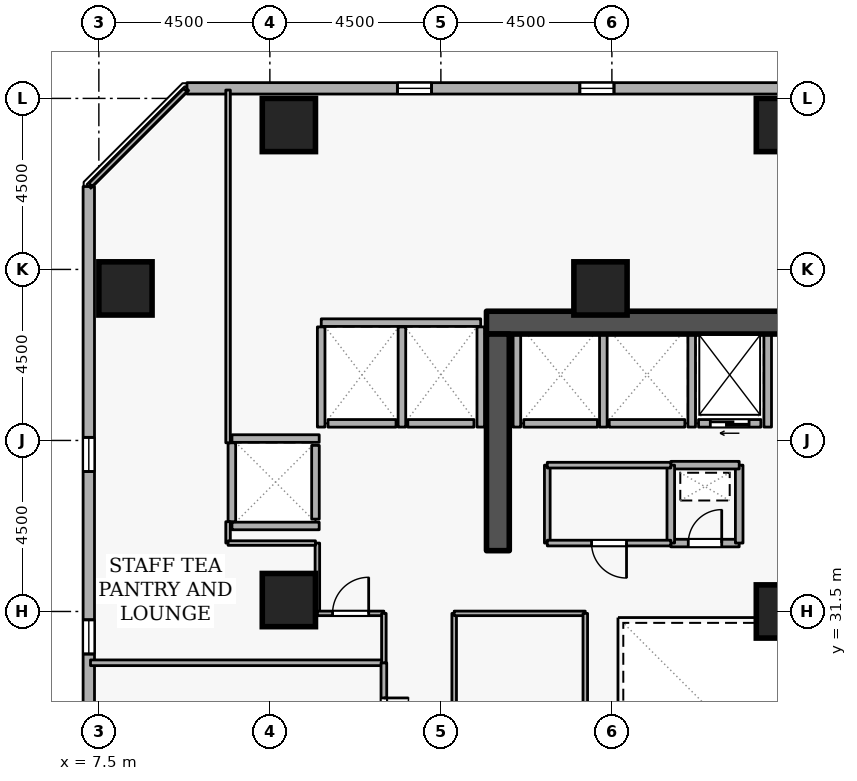
"""IFC4 building model, lengths in metres.
Left out: names, types, materials, properties, quantities, classifications, styles, units other than length and angle.
Written with IfcOpenShell. Run it as: python <this file> out.ifc"""

import sys

from ifc_helpers import new_model, si_unit, direction, frame, frame_2d, origin, origin_2d, place, context, subcontext, project, spatial, rectangle, extrude, element, fill, save


model = new_model("IFC4")
c1 = context("Model", 3, precision=1e-05, world=origin(), true_north=direction((0.0, 1.0)))
c2 = subcontext(c1, "Body", "Model", "MODEL_VIEW")
j1 = project(units=[si_unit("LENGTHUNIT", "METRE"), si_unit("PLANEANGLEUNIT", "RADIAN")], contexts=[c1])
p1 = place(None, origin())
s1 = spatial("IfcSite", under=j1, at=p1, CompositionType="ELEMENT")
p2 = place(p1, origin())
s2 = spatial("IfcBuilding", under=s1, at=p2, CompositionType="ELEMENT")
p3 = place(p2, frame((0.0, 0.0, 64.5)))
s3 = spatial("IfcBuildingStorey", under=s2, at=p3, CompositionType="ELEMENT", Elevation=64.5)
p4 = place(p3, frame((17.7, 39.1, 0.0), z_axis=(0.0, 0.0, 1.0), x_axis=(1.0, 0.0, 0.0)))
e1 = element("IfcWall", 1, at=p4, inside=s3, PredefinedType="SHEAR", context=c2, shape_type="SweptSolid", body=[
    extrude(rectangle(XDim=15.6, YDim=0.6, at=frame_2d((7.8, 0.0))), origin(), (0.0, 0.0, 1.0), 3.6),
])
p5 = place(p3, frame((18.0, 33.1, 0.0), z_axis=(0.0, 0.0, 1.0), x_axis=(0.0, 1.0, 0.0)))
e2 = element("IfcWall", 2, at=p5, inside=s3, PredefinedType="SHEAR", context=c2, shape_type="SweptSolid", body=[
    extrude(rectangle(XDim=5.7, YDim=0.6, at=frame_2d((2.85, 0.0))), origin(), (0.0, 0.0, 1.0), 3.6),
])
for number, where, z_axis, x_axis in (
    (3, (12.5, 44.3, 0.0), (0.0, 0.0, 1.0), (1.0, 0.0, 0.0)),
    (4, (25.5, 44.3, 0.0), (0.0, 0.0, 1.0), (1.0, 0.0, 0.0)),
    (5, (8.2, 40.0, 0.0), (0.0, 0.0, 1.0), (1.0, 0.0, 0.0)),
    (6, (12.5, 31.8, 0.0), (0.0, 0.0, 1.0), (1.0, 0.0, 0.0)),
    (7, (20.7, 40.0, 0.0), (0.0, 0.0, 1.0), (1.0, 0.0, 0.0)),
    (8, (25.5, 31.5, 0.0), (0.0, 0.0, 1.0), (1.0, 0.0, 0.0)),
):
    element("IfcColumn", number, at=place(p3, frame(where, z_axis=z_axis, x_axis=x_axis)), inside=s3, PredefinedType="COLUMN", context=c2, shape_type="SweptSolid", body=[
        extrude(rectangle(XDim=1.4, YDim=1.4, at=origin_2d()), origin(), (0.0, 0.0, 1.0), 3.6),
    ])
p6 = place(p3, frame((46.855, 45.264, 0.0), z_axis=(0.0, 0.0, 1.0), x_axis=(-0.999999999457, 3.2959355e-05, 0.0)))
e9 = element("IfcWall", 9, at=p6, inside=s3, PredefinedType="STANDARD", context=c2, shape_type="SweptSolid", body=[
    extrude(rectangle(XDim=37.037, YDim=0.3, at=frame_2d((18.518, 0.0))), origin(), (0.0, 0.0, 1.0), 2.7),
])
p7 = place(p6, frame((1.8, 0.0, 0.72)))
e10 = element("IfcOpeningElement", 10, at=p7, cuts=e9, PredefinedType="OPENING", context=c2, shape_type="SweptSolid", body=[
    extrude(rectangle(XDim=0.9, YDim=1.75, at=frame_2d((0.45, 0.875))), frame((0.0, 0.16, 0.0), z_axis=(0.0, -1.0, 0.0), x_axis=(1.0, 0.0, 0.0)), (0.0, 0.0, 1.0), 0.32),
])
p8 = place(p6, frame((11.4, 0.0, 0.72)))
e11 = element("IfcOpeningElement", 11, at=p8, cuts=e9, PredefinedType="OPENING", context=c2, shape_type="SweptSolid", body=[
    extrude(rectangle(XDim=0.9, YDim=1.75, at=frame_2d((0.45, 0.875))), frame((0.0, 0.16, 0.0), z_axis=(0.0, -1.0, 0.0), x_axis=(1.0, 0.0, 0.0)), (0.0, 0.0, 1.0), 0.32),
])
p9 = place(p6, frame((16.2, 0.0, 0.72)))
e12 = element("IfcOpeningElement", 12, at=p9, cuts=e9, PredefinedType="OPENING", context=c2, shape_type="SweptSolid", body=[
    extrude(rectangle(XDim=0.9, YDim=1.75, at=frame_2d((0.45, 0.875))), frame((0.0, 0.16, 0.0), z_axis=(0.0, -1.0, 0.0), x_axis=(1.0, 0.0, 0.0)), (0.0, 0.0, 1.0), 0.32),
])
p10 = place(p6, frame((25.8, 0.0, 0.72)))
e13 = element("IfcOpeningElement", 13, at=p10, cuts=e9, PredefinedType="OPENING", context=c2, shape_type="SweptSolid", body=[
    extrude(rectangle(XDim=0.9, YDim=1.75, at=frame_2d((0.45, 0.875))), frame((0.0, 0.16, 0.0), z_axis=(0.0, -1.0, 0.0), x_axis=(1.0, 0.0, 0.0)), (0.0, 0.0, 1.0), 0.32),
])
p11 = place(p6, frame((30.6, 0.0, 0.72)))
e14 = element("IfcOpeningElement", 14, at=p11, cuts=e9, PredefinedType="OPENING", context=c2, shape_type="SweptSolid", body=[
    extrude(rectangle(XDim=0.9, YDim=1.75, at=frame_2d((0.45, 0.875))), frame((0.0, 0.16, 0.0), z_axis=(0.0, -1.0, 0.0), x_axis=(1.0, 0.0, 0.0)), (0.0, 0.0, 1.0), 0.32),
])
p12 = place(p3, frame((7.235, 42.681, 0.0), z_axis=(0.0, 0.0, 1.0), x_axis=(3.2959355e-05, -0.999999999457, 0.0)))
e15 = element("IfcWall", 15, at=p12, inside=s3, PredefinedType="STANDARD", context=c2, shape_type="SweptSolid", body=[
    extrude(rectangle(XDim=37.037, YDim=0.3, at=frame_2d((18.518, 0.0))), origin(), (0.0, 0.0, 1.0), 2.7),
])
p13 = place(p12, frame((6.6, 0.0, 0.72)))
e16 = element("IfcOpeningElement", 16, at=p13, cuts=e15, PredefinedType="OPENING", context=c2, shape_type="SweptSolid", body=[
    extrude(rectangle(XDim=0.9, YDim=1.75, at=frame_2d((0.45, 0.875))), frame((0.0, 0.16, 0.0), z_axis=(0.0, -1.0, 0.0), x_axis=(1.0, 0.0, 0.0)), (0.0, 0.0, 1.0), 0.32),
])
p14 = place(p12, frame((11.4, 0.0, 0.72)))
e17 = element("IfcOpeningElement", 17, at=p14, cuts=e15, PredefinedType="OPENING", context=c2, shape_type="SweptSolid", body=[
    extrude(rectangle(XDim=0.9, YDim=1.75, at=frame_2d((0.45, 0.875))), frame((0.0, 0.16, 0.0), z_axis=(0.0, -1.0, 0.0), x_axis=(1.0, 0.0, 0.0)), (0.0, 0.0, 1.0), 0.32),
])
p15 = place(p12, frame((21.0, 0.0, 0.72)))
e18 = element("IfcOpeningElement", 18, at=p15, cuts=e15, PredefinedType="OPENING", context=c2, shape_type="SweptSolid", body=[
    extrude(rectangle(XDim=0.9, YDim=1.75, at=frame_2d((0.45, 0.875))), frame((0.0, 0.16, 0.0), z_axis=(0.0, -1.0, 0.0), x_axis=(1.0, 0.0, 0.0)), (0.0, 0.0, 1.0), 0.32),
])
p16 = place(p12, frame((25.8, 0.0, 0.72)))
e19 = element("IfcOpeningElement", 19, at=p16, cuts=e15, PredefinedType="OPENING", context=c2, shape_type="SweptSolid", body=[
    extrude(rectangle(XDim=0.9, YDim=1.75, at=frame_2d((0.45, 0.875))), frame((0.0, 0.16, 0.0), z_axis=(0.0, -1.0, 0.0), x_axis=(1.0, 0.0, 0.0)), (0.0, 0.0, 1.0), 0.32),
])
p17 = place(p3, frame((24.92, 36.45, 0.0), z_axis=(0.0, 0.0, 1.0), x_axis=(-1.0, 0.0, 0.0)))
e20 = element("IfcWall", 20, at=p17, inside=s3, PredefinedType="STANDARD", context=c2, shape_type="SweptSolid", body=[
    extrude(rectangle(XDim=1.64, YDim=0.2, at=frame_2d((0.82, 0.0))), origin(), (0.0, 0.0, 1.0), 3.34),
])
p18 = place(p17, frame((0.31, 0.0, 0.0)))
e21 = element("IfcOpeningElement", 21, at=p18, cuts=e20, PredefinedType="OPENING", context=c2, shape_type="SweptSolid", body=[
    extrude(rectangle(XDim=1.02, YDim=2.06, at=frame_2d((0.51, 1.03))), frame((0.0, 0.11, 0.0), z_axis=(0.0, -1.0, 0.0), x_axis=(1.0, 0.0, 0.0)), (0.0, 0.0, 1.0), 0.22),
])
p19 = place(p3, frame((22.92, 36.45, 0.0), z_axis=(0.0, 0.0, 1.0), x_axis=(-1.0, 0.0, 0.0)))
e22 = element("IfcWall", 22, at=p19, inside=s3, PredefinedType="STANDARD", context=c2, shape_type="SweptSolid", body=[
    extrude(rectangle(XDim=1.99, YDim=0.2, at=frame_2d((0.995, 0.0))), origin(), (0.0, 0.0, 1.0), 3.34),
])
p20 = place(p3, frame((20.62, 36.45, 0.0), z_axis=(0.0, 0.0, 1.0), x_axis=(-1.0, 0.0, 0.0)))
e23 = element("IfcWall", 23, at=p20, inside=s3, PredefinedType="STANDARD", context=c2, shape_type="SweptSolid", body=[
    extrude(rectangle(XDim=1.94, YDim=0.2, at=frame_2d((0.97, 0.0))), origin(), (0.0, 0.0, 1.0), 3.34),
])
p21 = place(p3, frame((17.37, 36.45, 0.0), z_axis=(0.0, 0.0, 1.0), x_axis=(-1.0, 0.0, 0.0)))
e24 = element("IfcWall", 24, at=p21, inside=s3, PredefinedType="STANDARD", context=c2, shape_type="SweptSolid", body=[
    extrude(rectangle(XDim=1.74, YDim=0.2, at=frame_2d((0.87, 0.0))), origin(), (0.0, 0.0, 1.0), 3.34),
])
p22 = place(p3, frame((15.32, 36.45, 0.0), z_axis=(0.0, 0.0, 1.0), x_axis=(-1.0, 0.0, 0.0)))
e25 = element("IfcWall", 25, at=p22, inside=s3, PredefinedType="STANDARD", context=c2, shape_type="SweptSolid", body=[
    extrude(rectangle(XDim=1.79, YDim=0.2, at=frame_2d((0.895, 0.0))), origin(), (0.0, 0.0, 1.0), 3.34),
])
p23 = place(p3, frame((13.2, 33.93, 0.0), z_axis=(0.0, 0.0, 1.0), x_axis=(0.0, 1.0, 0.0)))
e26 = element("IfcWall", 26, at=p23, inside=s3, PredefinedType="STANDARD", context=c2, shape_type="SweptSolid", body=[
    extrude(rectangle(XDim=1.94, YDim=0.2, at=frame_2d((0.97, 0.0))), origin(), (0.0, 0.0, 1.0), 3.34),
])
for number, where, z_axis, x_axis in (
    (27, (25.1, 36.352, 0.0), (0.0, 0.0, 1.0), (0.0, 1.0, 0.0)),
    (28, (23.1, 36.352, 0.0), (0.0, 0.0, 1.0), (0.0, 1.0, 0.0)),
    (29, (20.775, 36.352, 0.0), (0.0, 0.0, 1.0), (0.0, 1.0, 0.0)),
    (30, (18.5, 36.352, 0.0), (0.0, 0.0, 1.0), (0.0, 1.0, 0.0)),
):
    element("IfcWall", number, at=place(p3, frame(where, z_axis=z_axis, x_axis=x_axis)), inside=s3, PredefinedType="STANDARD", context=c2, shape_type="SweptSolid", body=[
        extrude(rectangle(XDim=2.436, YDim=0.2, at=frame_2d((1.218, 0.0))), origin(), (0.0, 0.0, 1.0), 3.34),
    ])
p24 = place(p3, frame((13.352, 39.1, 0.0), z_axis=(0.0, 0.0, 1.0), x_axis=(1.0, 0.0, 0.0)))
e31 = element("IfcWall", 31, at=p24, inside=s3, PredefinedType="STANDARD", context=c2, shape_type="SweptSolid", body=[
    extrude(rectangle(XDim=4.196, YDim=0.2, at=frame_2d((2.098, 0.0))), origin(), (0.0, 0.0, 1.0), 3.34),
])
p25 = place(p3, frame((17.55, 36.352, 0.0), z_axis=(0.0, 0.0, 1.0), x_axis=(0.0, 1.0, 0.0)))
e32 = element("IfcWall", 32, at=p25, inside=s3, PredefinedType="STANDARD", context=c2, shape_type="SweptSolid", body=[
    extrude(rectangle(XDim=2.636, YDim=0.2, at=frame_2d((1.318, 0.0))), origin(), (0.0, 0.0, 1.0), 2.545),
])
for number, where, z_axis, x_axis in (
    (33, (15.475, 36.352, 0.0), (0.0, 0.0, 1.0), (0.0, 1.0, 0.0)),
    (34, (13.35, 36.352, 0.0), (0.0, 0.0, 1.0), (0.0, 1.0, 0.0)),
):
    element("IfcWall", number, at=place(p3, frame(where, z_axis=z_axis, x_axis=x_axis)), inside=s3, PredefinedType="STANDARD", context=c2, shape_type="SweptSolid", body=[
        extrude(rectangle(XDim=2.636, YDim=0.2, at=frame_2d((1.318, 0.0))), origin(), (0.0, 0.0, 1.0), 3.34),
    ])
for number, where, z_axis, x_axis in (
    (35, (11.002, 36.05, 0.0), (0.0, 0.0, 1.0), (1.0, 0.0, 0.0)),
    (36, (11.002, 33.75, 0.0), (0.0, 0.0, 1.0), (1.0, 0.0, 0.0)),
):
    element("IfcWall", number, at=place(p3, frame(where, z_axis=z_axis, x_axis=x_axis)), inside=s3, PredefinedType="STANDARD", context=c2, shape_type="SweptSolid", body=[
        extrude(rectangle(XDim=2.296, YDim=0.2, at=frame_2d((1.148, 0.0))), origin(), (0.0, 0.0, 1.0), 3.34),
    ])
p26 = place(p3, frame((11.0, 33.862, 0.0), z_axis=(0.0, 0.0, 1.0), x_axis=(0.0, 1.0, 0.0)))
e37 = element("IfcWall", 37, at=p26, inside=s3, PredefinedType="STANDARD", context=c2, shape_type="SweptSolid", body=[
    extrude(rectangle(XDim=2.076, YDim=0.2, at=frame_2d((1.038, 0.0))), origin(), (0.0, 0.0, 1.0), 3.34),
])
p27 = place(p3, frame((22.55, 33.3, 0.0), z_axis=(0.0, 0.0, 1.0), x_axis=(1.0, 0.0, 0.0)))
e38 = element("IfcWall", 38, at=p27, inside=s3, PredefinedType="STANDARD", context=c2, shape_type="SweptSolid", body=[
    extrude(rectangle(XDim=1.8, YDim=0.2, at=frame_2d((0.9, 0.0))), origin(), (0.0, 0.0, 1.0), 3.34),
])
p28 = place(p27, frame((0.46, 0.0, 0.0)))
e39 = element("IfcOpeningElement", 39, at=p28, cuts=e38, PredefinedType="OPENING", context=c2, shape_type="SweptSolid", body=[
    extrude(rectangle(XDim=0.88, YDim=2.04, at=frame_2d((0.44, 1.02))), frame((0.0, 0.11, 0.0), z_axis=(0.0, -1.0, 0.0), x_axis=(1.0, 0.0, 0.0)), (0.0, 0.0, 1.0), 0.22),
])
p29 = place(p3, frame((24.35, 33.3, 0.0), z_axis=(0.0, 0.0, 1.0), x_axis=(0.0, 1.0, 0.0)))
e40 = element("IfcWall", 40, at=p29, inside=s3, PredefinedType="STANDARD", context=c2, shape_type="SweptSolid", body=[
    extrude(rectangle(XDim=2.05, YDim=0.2, at=frame_2d((1.025, 0.0))), origin(), (0.0, 0.0, 1.0), 3.34),
])
p30 = place(p3, frame((24.35, 35.35, 0.0), z_axis=(0.0, 0.0, 1.0), x_axis=(-1.0, 0.0, 0.0)))
e41 = element("IfcWall", 41, at=p30, inside=s3, PredefinedType="STANDARD", context=c2, shape_type="SweptSolid", body=[
    extrude(rectangle(XDim=1.8, YDim=0.2, at=frame_2d((0.9, 0.0))), origin(), (0.0, 0.0, 1.0), 3.34),
])
p31 = place(p3, frame((22.55, 35.35, 0.0), z_axis=(0.0, 0.0, 1.0), x_axis=(0.0, -1.0, 0.0)))
e42 = element("IfcWall", 42, at=p31, inside=s3, PredefinedType="STANDARD", context=c2, shape_type="SweptSolid", body=[
    extrude(rectangle(XDim=2.05, YDim=0.2, at=frame_2d((1.025, 0.0))), origin(), (0.0, 0.0, 1.0), 3.34),
])
p32 = place(p3, frame((19.3, 33.3, 0.0), z_axis=(0.0, 0.0, 1.0), x_axis=(0.0, 1.0, 0.0)))
e43 = element("IfcWall", 43, at=p32, inside=s3, PredefinedType="PARTITIONING", context=c2, shape_type="SweptSolid", body=[
    extrude(rectangle(XDim=2.05, YDim=0.15, at=frame_2d((1.025, 0.0))), origin(), (0.0, 0.0, 1.0), 3.34),
])
p33 = place(p3, frame((19.3, 35.35, 0.0), z_axis=(0.0, 0.0, 1.0), x_axis=(1.0, 0.0, 0.0)))
e44 = element("IfcWall", 44, at=p33, inside=s3, PredefinedType="PARTITIONING", context=c2, shape_type="SweptSolid", body=[
    extrude(rectangle(XDim=3.25, YDim=0.15, at=frame_2d((1.625, 0.0))), origin(), (0.0, 0.0, 1.0), 3.34),
])
p34 = place(p3, frame((22.55, 33.3, 0.0), z_axis=(0.0, 0.0, 1.0), x_axis=(-1.0, 0.0, 0.0)))
e45 = element("IfcWall", 45, at=p34, inside=s3, PredefinedType="PARTITIONING", context=c2, shape_type="SweptSolid", body=[
    extrude(rectangle(XDim=3.25, YDim=0.15, at=frame_2d((1.625, 0.0))), origin(), (0.0, 0.0, 1.0), 3.34),
])
p35 = place(p34, frame((1.165, 0.0, 0.0)))
e46 = element("IfcOpeningElement", 46, at=p35, cuts=e45, PredefinedType="OPENING", context=c2, shape_type="SweptSolid", body=[
    extrude(rectangle(XDim=0.92, YDim=2.08, at=frame_2d((0.46, 1.04))), frame((0.0, 0.085, 0.0), z_axis=(0.0, -1.0, 0.0), x_axis=(1.0, 0.0, 0.0)), (0.0, 0.0, 1.0), 0.17),
])
p36 = place(p3, frame((7.28, 30.15, 0.0), z_axis=(0.0, 0.0, 1.0), x_axis=(1.0, 0.0, 0.0)))
e47 = element("IfcWall", 47, at=p36, inside=s3, PredefinedType="PARTITIONING", context=c2, shape_type="SweptSolid", body=[
    extrude(rectangle(XDim=7.72, YDim=0.15, at=frame_2d((3.86, 0.0))), origin(), (0.0, 0.0, 1.0), 3.34),
])
p37 = place(p3, frame((15.0, 30.15, 0.0), z_axis=(0.0, 0.0, 1.0), x_axis=(0.0, -1.0, 0.0)))
e48 = element("IfcWall", 48, at=p37, inside=s3, PredefinedType="PARTITIONING", context=c2, shape_type="SweptSolid", body=[
    extrude(rectangle(XDim=3.15, YDim=0.15, at=frame_2d((1.575, 0.0))), origin(), (0.0, 0.0, 1.0), 3.34),
])
p38 = place(p37, frame((0.925, 0.0, 0.0)))
e49 = element("IfcOpeningElement", 49, at=p38, cuts=e48, PredefinedType="OPENING", context=c2, shape_type="SweptSolid", body=[
    extrude(rectangle(XDim=1.3, YDim=2.12, at=frame_2d((0.65, 1.06))), frame((0.0, 0.085, 0.0), z_axis=(0.0, -1.0, 0.0), x_axis=(1.0, 0.0, 0.0)), (0.0, 0.0, 1.0), 0.17),
])
p39 = place(p3, frame((13.25, 33.3, 0.0), z_axis=(0.0, 0.0, 1.0), x_axis=(0.0, -1.0, 0.0)))
e50 = element("IfcWall", 50, at=p39, inside=s3, PredefinedType="PARTITIONING", context=c2, shape_type="SweptSolid", body=[
    extrude(rectangle(XDim=1.85, YDim=0.12, at=frame_2d((0.925, 0.0))), origin(), (0.0, 0.0, 1.0), 3.34),
])
p40 = place(p3, frame((13.25, 31.45, 0.0), z_axis=(0.0, 0.0, 1.0), x_axis=(1.0, 0.0, 0.0)))
e51 = element("IfcWall", 51, at=p40, inside=s3, PredefinedType="PARTITIONING", context=c2, shape_type="SweptSolid", body=[
    extrude(rectangle(XDim=1.75, YDim=0.12, at=frame_2d((0.875, 0.0))), origin(), (0.0, 0.0, 1.0), 3.34),
])
p41 = place(p40, frame((0.4, 0.0, 0.0)))
e52 = element("IfcOpeningElement", 52, at=p41, cuts=e51, PredefinedType="OPENING", context=c2, shape_type="SweptSolid", body=[
    extrude(rectangle(XDim=0.95, YDim=2.1, at=frame_2d((0.475, 1.05))), frame((0.0, 0.07, 0.0), z_axis=(0.0, -1.0, 0.0), x_axis=(1.0, 0.0, 0.0)), (0.0, 0.0, 1.0), 0.14),
])
p42 = place(p3, frame((15.0, 31.45, 0.0), z_axis=(0.0, 0.0, 1.0), x_axis=(0.0, -1.0, 0.0)))
e53 = element("IfcWall", 53, at=p42, inside=s3, PredefinedType="PARTITIONING", context=c2, shape_type="SweptSolid", body=[
    extrude(rectangle(XDim=1.3, YDim=0.12, at=frame_2d((0.65, 0.0))), origin(), (0.0, 0.0, 1.0), 3.34),
])
p43 = place(p3, frame((7.28, 42.725, 0.0), z_axis=(0.0, 0.0, 1.0), x_axis=(0.707106781187, 0.707106781187, 0.0)))
e54 = element("IfcWall", 54, at=p43, inside=s3, PredefinedType="PARTITIONING", context=c2, shape_type="SweptSolid", body=[
    extrude(rectangle(XDim=3.528, YDim=0.12, at=frame_2d((1.764, 0.0))), origin(), (0.0, 0.0, 1.0), 3.34),
])
p44 = place(p3, frame((10.9, 45.22, 0.0), z_axis=(0.0, 0.0, 1.0), x_axis=(0.0, -1.0, 0.0)))
e55 = element("IfcWall", 55, at=p44, inside=s3, PredefinedType="PARTITIONING", context=c2, shape_type="SweptSolid", body=[
    extrude(rectangle(XDim=9.282, YDim=0.12, at=frame_2d((4.641, 0.0))), origin(), (0.0, 0.0, 1.0), 3.34),
])
p45 = place(p3, frame((10.9, 33.862, 0.0), z_axis=(0.0, 0.0, 1.0), x_axis=(0.0, -1.0, 0.0)))
e56 = element("IfcWall", 56, at=p45, inside=s3, PredefinedType="PARTITIONING", context=c2, shape_type="SweptSolid", body=[
    extrude(rectangle(XDim=0.562, YDim=0.12, at=frame_2d((0.281, 0.0))), origin(), (0.0, 0.0, 1.0), 3.34),
])
p46 = place(p3, frame((10.9, 33.3, 0.0), z_axis=(0.0, 0.0, 1.0), x_axis=(1.0, 0.0, 0.0)))
e57 = element("IfcWall", 57, at=p46, inside=s3, PredefinedType="PARTITIONING", context=c2, shape_type="SweptSolid", body=[
    extrude(rectangle(XDim=2.3, YDim=0.12, at=frame_2d((1.15, 0.0))), origin(), (0.0, 0.0, 1.0), 3.34),
])
p47 = place(p3, frame((16.85, 22.55, 0.0), z_axis=(0.0, 0.0, 1.0), x_axis=(0.0, 1.0, 0.0)))
e58 = element("IfcWall", 58, at=p47, inside=s3, PredefinedType="PARTITIONING", context=c2, shape_type="SweptSolid", body=[
    extrude(rectangle(XDim=8.9, YDim=0.12, at=frame_2d((4.45, 0.0))), origin(), (0.0, 0.0, 1.0), 3.34),
])
p48 = place(p47, frame((3.975, 0.0, 0.0)))
e59 = element("IfcOpeningElement", 59, at=p48, cuts=e58, PredefinedType="OPENING", context=c2, shape_type="SweptSolid", body=[
    extrude(rectangle(XDim=0.95, YDim=2.1, at=frame_2d((0.475, 1.05))), frame((0.0, 0.07, 0.0), z_axis=(0.0, -1.0, 0.0), x_axis=(1.0, 0.0, 0.0)), (0.0, 0.0, 1.0), 0.14),
])
p49 = place(p3, frame((16.85, 31.45, 0.0), z_axis=(0.0, 0.0, 1.0), x_axis=(1.0, 0.0, 0.0)))
e60 = element("IfcWall", 60, at=p49, inside=s3, PredefinedType="PARTITIONING", context=c2, shape_type="SweptSolid", body=[
    extrude(rectangle(XDim=3.45, YDim=0.12, at=frame_2d((1.725, 0.0))), origin(), (0.0, 0.0, 1.0), 3.34),
])
p50 = place(p3, frame((20.3, 31.45, 0.0), z_axis=(0.0, 0.0, 1.0), x_axis=(0.0, -1.0, 0.0)))
e61 = element("IfcWall", 61, at=p50, inside=s3, PredefinedType="PARTITIONING", context=c2, shape_type="SweptSolid", body=[
    extrude(rectangle(XDim=8.9, YDim=0.12, at=frame_2d((4.45, 0.0))), origin(), (0.0, 0.0, 1.0), 3.34),
])
p51 = place(p10, origin())
e62 = element("IfcWindow", 62, at=p51, inside=s3, PartitioningType="SINGLE_PANEL", PredefinedType="WINDOW", context=c2, shape_type="SweptSolid", body=[
    extrude(rectangle(XDim=0.9, YDim=1.75, at=frame_2d((0.45, 0.875))), frame((0.0, 0.03, 0.0), z_axis=(0.0, -1.0, 0.0), x_axis=(1.0, 0.0, 0.0)), (0.0, 0.0, 1.0), 0.06),
])
fill(e13, e62)
p52 = place(p11, origin())
e63 = element("IfcWindow", 63, at=p52, inside=s3, PartitioningType="SINGLE_PANEL", PredefinedType="WINDOW", context=c2, shape_type="SweptSolid", body=[
    extrude(rectangle(XDim=0.9, YDim=1.75, at=frame_2d((0.45, 0.875))), frame((0.0, 0.03, 0.0), z_axis=(0.0, -1.0, 0.0), x_axis=(1.0, 0.0, 0.0)), (0.0, 0.0, 1.0), 0.06),
])
fill(e14, e63)
p53 = place(p13, origin())
e64 = element("IfcWindow", 64, at=p53, inside=s3, PartitioningType="SINGLE_PANEL", PredefinedType="WINDOW", context=c2, shape_type="SweptSolid", body=[
    extrude(rectangle(XDim=0.9, YDim=1.75, at=frame_2d((0.45, 0.875))), frame((0.0, 0.03, 0.0), z_axis=(0.0, -1.0, 0.0), x_axis=(1.0, 0.0, 0.0)), (0.0, 0.0, 1.0), 0.06),
])
fill(e16, e64)
p54 = place(p14, origin())
e65 = element("IfcWindow", 65, at=p54, inside=s3, PartitioningType="SINGLE_PANEL", PredefinedType="WINDOW", context=c2, shape_type="SweptSolid", body=[
    extrude(rectangle(XDim=0.9, YDim=1.75, at=frame_2d((0.45, 0.875))), frame((0.0, 0.03, 0.0), z_axis=(0.0, -1.0, 0.0), x_axis=(1.0, 0.0, 0.0)), (0.0, 0.0, 1.0), 0.06),
])
fill(e17, e65)
p55 = place(p18, origin())
e66 = element("IfcDoor", 66, at=p55, inside=s3, OperationType="SLIDING_TO_LEFT", PredefinedType="DOOR", context=c2, shape_type="SweptSolid", body=[
    extrude(rectangle(XDim=1.02, YDim=2.06, at=frame_2d((0.51, 1.03))), frame((0.0, 0.025, 0.0), z_axis=(0.0, -1.0, 0.0), x_axis=(1.0, 0.0, 0.0)), (0.0, 0.0, 1.0), 0.05),
])
fill(e21, e66)
p56 = place(p28, origin())
e67 = element("IfcDoor", 67, at=p56, inside=s3, OperationType="SINGLE_SWING_RIGHT", PredefinedType="DOOR", context=c2, shape_type="SweptSolid", body=[
    extrude(rectangle(XDim=0.88, YDim=2.04, at=frame_2d((0.44, 1.02))), frame((0.0, 0.025, 0.0), z_axis=(0.0, -1.0, 0.0), x_axis=(1.0, 0.0, 0.0)), (0.0, 0.0, 1.0), 0.05),
])
fill(e39, e67)
p57 = place(p35, origin())
e68 = element("IfcDoor", 68, at=p57, inside=s3, OperationType="SINGLE_SWING_LEFT", PredefinedType="DOOR", context=c2, shape_type="SweptSolid", body=[
    extrude(rectangle(XDim=0.92, YDim=2.08, at=frame_2d((0.46, 1.04))), frame((0.0, 0.025, 0.0), z_axis=(0.0, -1.0, 0.0), x_axis=(1.0, 0.0, 0.0)), (0.0, 0.0, 1.0), 0.05),
])
fill(e46, e68)
p58 = place(p38, origin())
e69 = element("IfcDoor", 69, at=p58, inside=s3, OperationType="DOUBLE_DOOR_SINGLE_SWING", PredefinedType="DOOR", context=c2, shape_type="SweptSolid", body=[
    extrude(rectangle(XDim=1.3, YDim=2.12, at=frame_2d((0.65, 1.06))), frame((0.0, 0.025, 0.0), z_axis=(0.0, -1.0, 0.0), x_axis=(1.0, 0.0, 0.0)), (0.0, 0.0, 1.0), 0.05),
])
fill(e49, e69)
p59 = place(p41, origin())
e70 = element("IfcDoor", 70, at=p59, inside=s3, OperationType="SINGLE_SWING_RIGHT", PredefinedType="DOOR", context=c2, shape_type="SweptSolid", body=[
    extrude(rectangle(XDim=0.95, YDim=2.1, at=frame_2d((0.475, 1.05))), frame((0.0, 0.025, 0.0), z_axis=(0.0, -1.0, 0.0), x_axis=(1.0, 0.0, 0.0)), (0.0, 0.0, 1.0), 0.05),
])
fill(e52, e70)
save(model, sys.argv[1])
